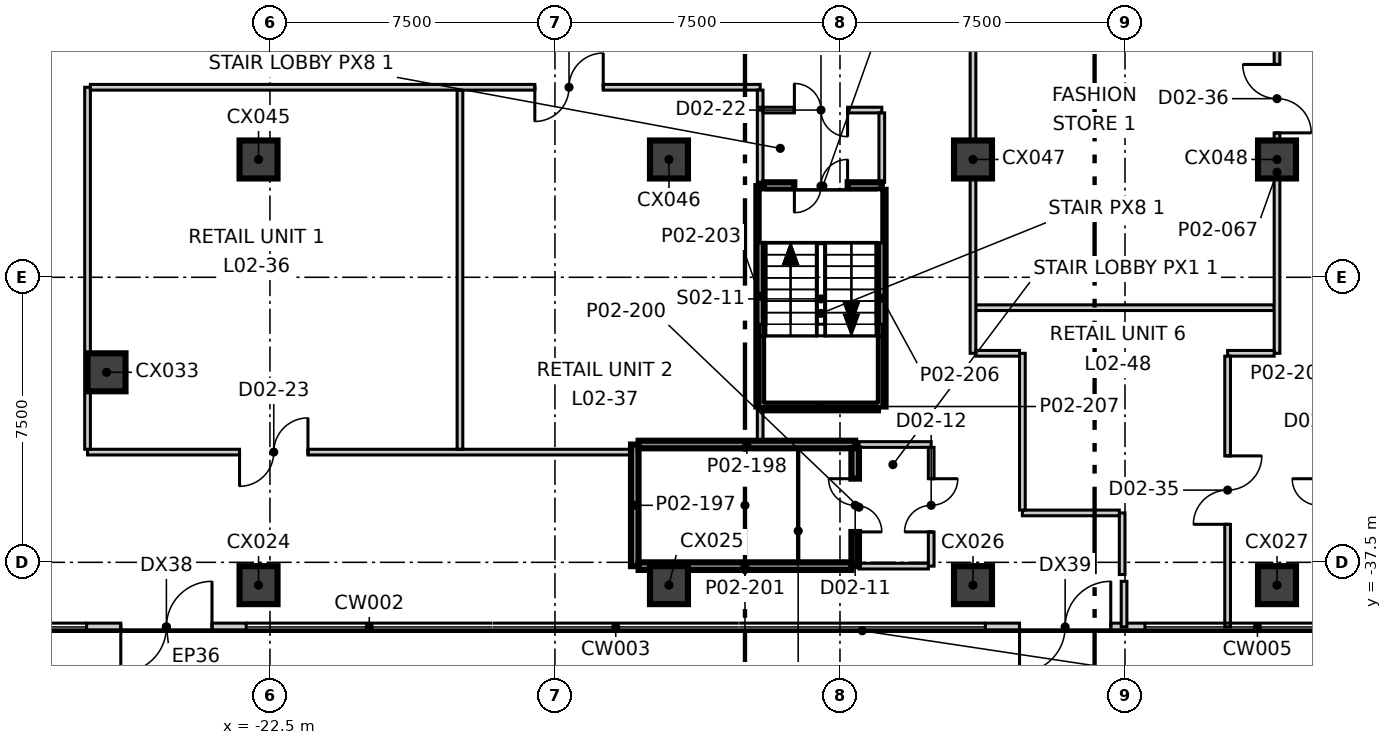
"""IFC4 building model, lengths in metres.
Left out: names, types, materials, properties, quantities, classifications, styles, units other than length and angle.
Written with IfcOpenShell. Run it as: python <this file> out.ifc"""

import sys

from ifc_helpers import new_model, si_unit, direction, frame, frame_2d, origin, origin_2d, place, context, subcontext, project, spatial, rectangle, extrude, element, fill, save


model = new_model("IFC4")
c1 = context("Model", 3, precision=1e-05, world=origin(), true_north=direction((0.0, 1.0)))
c2 = subcontext(c1, "Body", "Model", "MODEL_VIEW")
j1 = project(units=[si_unit("LENGTHUNIT", "METRE"), si_unit("PLANEANGLEUNIT", "RADIAN")], contexts=[c1])
p1 = place(None, origin())
s1 = spatial("IfcSite", under=j1, at=p1, CompositionType="ELEMENT")
p2 = place(p1, origin())
s2 = spatial("IfcBuilding", under=s1, at=p2, CompositionType="ELEMENT")
p3 = place(p2, frame((0.0, 0.0, 14.5)))
s3 = spatial("IfcBuildingStorey", under=s2, at=p3, CompositionType="ELEMENT", Elevation=14.5)
for number, where, z_axis, x_axis in (
    (1, (-22.8, -38.1, -0.4), (0.0, 0.0, 1.0), (1.0, 0.0, 0.0)),
    (2, (-12.0, -38.1, -0.4), (0.0, 0.0, 1.0), (1.0, 0.0, 0.0)),
    (3, (-4.0, -38.1, -0.4), (0.0, 0.0, 1.0), (1.0, 0.0, 0.0)),
    (4, (4.0, -38.1, -0.4), (0.0, 0.0, 1.0), (1.0, 0.0, 0.0)),
    (5, (-26.8, -32.5, -0.4), (0.0, 0.0, 1.0), (1.0, 0.0, 0.0)),
    (6, (-22.8, -26.9, -0.4), (0.0, 0.0, 1.0), (1.0, 0.0, 0.0)),
    (7, (-12.0, -26.9, -0.4), (0.0, 0.0, 1.0), (1.0, 0.0, 0.0)),
    (8, (-4.0, -26.9, -0.4), (0.0, 0.0, 1.0), (1.0, 0.0, 0.0)),
    (9, (4.0, -26.9, -0.4), (0.0, 0.0, 1.0), (1.0, 0.0, 0.0)),
):
    element("IfcColumn", number, at=place(p3, frame(where, z_axis=z_axis, x_axis=x_axis)), inside=s3, PredefinedType="COLUMN", context=c2, shape_type="SweptSolid", body=[
        extrude(rectangle(XDim=1.0, YDim=1.0, at=origin_2d()), origin(), (0.0, 0.0, 1.0), 5.4),
    ])
p4 = place(p3, frame((-27.325, -39.2, 0.0), z_axis=(0.0, 0.0, 1.0), x_axis=(1.0, 0.0, 0.0)))
e10 = element("IfcWall", 10, at=p4, inside=s3, PredefinedType="ELEMENTEDWALL", context=c2, shape_type="SweptSolid", body=[
    extrude(rectangle(XDim=4.2, YDim=0.2, at=frame_2d((2.1, 0.0))), origin(), (0.0, 0.0, 1.0), 5.0),
])
p5 = place(p4, frame((0.9, 0.0, 0.0)))
e11 = element("IfcOpeningElement", 11, at=p5, cuts=e10, PredefinedType="OPENING", context=c2, shape_type="SweptSolid", body=[
    extrude(rectangle(XDim=2.4, YDim=2.4, at=frame_2d((1.2, 1.2))), frame((0.0, 0.11, 0.0), z_axis=(0.0, -1.0, 0.0), x_axis=(1.0, 0.0, 0.0)), (0.0, 0.0, 1.0), 0.22),
])
p6 = place(p3, frame((-3.675, -39.2, 0.0), z_axis=(0.0, 0.0, 1.0), x_axis=(1.0, 0.0, 0.0)))
e12 = element("IfcWall", 12, at=p6, inside=s3, PredefinedType="ELEMENTEDWALL", context=c2, shape_type="SweptSolid", body=[
    extrude(rectangle(XDim=4.2, YDim=0.2, at=frame_2d((2.1, 0.0))), origin(), (0.0, 0.0, 1.0), 5.0),
])
p7 = place(p6, frame((0.9, 0.0, 0.0)))
e13 = element("IfcOpeningElement", 13, at=p7, cuts=e12, PredefinedType="OPENING", context=c2, shape_type="SweptSolid", body=[
    extrude(rectangle(XDim=2.4, YDim=2.4, at=frame_2d((1.2, 1.2))), frame((0.0, 0.11, 0.0), z_axis=(0.0, -1.0, 0.0), x_axis=(1.0, 0.0, 0.0)), (0.0, 0.0, 1.0), 0.22),
])
p8 = place(p3, frame((-9.6, -27.5, 0.0), z_axis=(0.0, 0.0, 1.0), x_axis=(0.0, 1.0, 0.0)))
e14 = element("IfcWall", 14, at=p8, inside=s3, PredefinedType="PARTITIONING", context=c2, shape_type="SweptSolid", body=[
    extrude(rectangle(XDim=1.9, YDim=0.15, at=frame_2d((0.95, 0.0))), origin(), (0.0, 0.0, 1.0), 5.0),
])
p9 = place(p3, frame((-9.525, -25.6, 0.0), z_axis=(0.0, 0.0, 1.0), x_axis=(1.0, 0.0, 0.0)))
e15 = element("IfcWall", 15, at=p9, inside=s3, PredefinedType="PARTITIONING", context=c2, shape_type="SweptSolid", body=[
    extrude(rectangle(XDim=3.125, YDim=0.15, at=frame_2d((1.562, 0.0))), origin(), (0.0, 0.0, 1.0), 5.0),
])
p10 = place(p9, frame((0.825, 0.0, 0.0)))
e16 = element("IfcOpeningElement", 16, at=p10, cuts=e15, PredefinedType="OPENING", context=c2, shape_type="SweptSolid", body=[
    extrude(rectangle(XDim=1.4, YDim=2.1, at=frame_2d((0.7, 1.05))), frame((0.0, 0.085, 0.0), z_axis=(0.0, -1.0, 0.0), x_axis=(1.0, 0.0, 0.0)), (0.0, 0.0, 1.0), 0.17),
])
p11 = place(p3, frame((-6.4, -27.5, 0.0), z_axis=(0.0, 0.0, 1.0), x_axis=(0.0, 1.0, 0.0)))
e17 = element("IfcWall", 17, at=p11, inside=s3, PredefinedType="PARTITIONING", context=c2, shape_type="SweptSolid", body=[
    extrude(rectangle(XDim=1.825, YDim=0.15, at=frame_2d((0.913, 0.0))), origin(), (0.0, 0.0, 1.0), 5.0),
])
p12 = place(p3, frame((-7.0, -34.4, 0.0), z_axis=(0.0, 0.0, 1.0), x_axis=(1.0, 0.0, 0.0)))
e18 = element("IfcWall", 18, at=p12, inside=s3, PredefinedType="PARTITIONING", context=c2, shape_type="SweptSolid", body=[
    extrude(rectangle(XDim=1.9, YDim=0.15, at=frame_2d((0.95, 0.0))), origin(), (0.0, 0.0, 1.0), 5.0),
])
p13 = place(p3, frame((-5.1, -37.6, 0.0), z_axis=(0.0, 0.0, 1.0), x_axis=(0.0, 1.0, 0.0)))
e19 = element("IfcWall", 19, at=p13, inside=s3, PredefinedType="PARTITIONING", context=c2, shape_type="SweptSolid", body=[
    extrude(rectangle(XDim=3.125, YDim=0.15, at=frame_2d((1.562, 0.0))), origin(), (0.0, 0.0, 1.0), 5.0),
])
p14 = place(p13, frame((0.9, 0.0, 0.0)))
e20 = element("IfcOpeningElement", 20, at=p14, cuts=e19, PredefinedType="OPENING", context=c2, shape_type="SweptSolid", body=[
    extrude(rectangle(XDim=1.4, YDim=2.1, at=frame_2d((0.7, 1.05))), frame((0.0, 0.085, 0.0), z_axis=(0.0, -1.0, 0.0), x_axis=(1.0, 0.0, 0.0)), (0.0, 0.0, 1.0), 0.17),
])
p15 = place(p3, frame((-7.0, -37.6, 0.0), z_axis=(0.0, 0.0, 1.0), x_axis=(1.0, 0.0, 0.0)))
e21 = element("IfcWall", 21, at=p15, inside=s3, PredefinedType="PARTITIONING", context=c2, shape_type="SweptSolid", body=[
    extrude(rectangle(XDim=1.825, YDim=0.15, at=frame_2d((0.913, 0.0))), origin(), (0.0, 0.0, 1.0), 5.0),
])
p16 = place(p3, frame((-27.3, -34.6, 0.0), z_axis=(0.0, 0.0, 1.0), x_axis=(1.0, 0.0, 0.0)))
e22 = element("IfcWall", 22, at=p16, inside=s3, PredefinedType="PARTITIONING", context=c2, shape_type="SweptSolid", body=[
    extrude(rectangle(XDim=14.3, YDim=0.15, at=frame_2d((7.15, 0.0))), origin(), (0.0, 0.0, 1.0), 5.0),
])
p17 = place(p16, frame((4.0, 0.0, 0.0)))
e23 = element("IfcOpeningElement", 23, at=p17, cuts=e22, PredefinedType="OPENING", context=c2, shape_type="SweptSolid", body=[
    extrude(rectangle(XDim=1.8, YDim=2.1, at=frame_2d((0.9, 1.05))), frame((0.0, 0.085, 0.0), z_axis=(0.0, -1.0, 0.0), x_axis=(1.0, 0.0, 0.0)), (0.0, 0.0, 1.0), 0.17),
])
p18 = place(p3, frame((-17.5, -34.525, 0.0), z_axis=(0.0, 0.0, 1.0), x_axis=(0.0, 1.0, 0.0)))
e24 = element("IfcWall", 24, at=p18, inside=s3, PredefinedType="PARTITIONING", context=c2, shape_type="SweptSolid", body=[
    extrude(rectangle(XDim=9.45, YDim=0.15, at=frame_2d((4.725, 0.0))), origin(), (0.0, 0.0, 1.0), 5.0),
])
p19 = place(p3, frame((-27.3, -34.525, 0.0), z_axis=(0.0, 0.0, 1.0), x_axis=(0.0, 1.0, 0.0)))
e25 = element("IfcWall", 25, at=p19, inside=s3, PredefinedType="PARTITIONING", context=c2, shape_type="SweptSolid", body=[
    extrude(rectangle(XDim=9.525, YDim=0.15, at=frame_2d((4.762, 0.0))), origin(), (0.0, 0.0, 1.0), 5.0),
])
p20 = place(p3, frame((-27.225, -25.0, 0.0), z_axis=(0.0, 0.0, 1.0), x_axis=(1.0, 0.0, 0.0)))
e26 = element("IfcWall", 26, at=p20, inside=s3, PredefinedType="PARTITIONING", context=c2, shape_type="SweptSolid", body=[
    extrude(rectangle(XDim=17.625, YDim=0.15, at=frame_2d((8.812, 0.0))), origin(), (0.0, 0.0, 1.0), 5.0),
])
p21 = place(p20, frame((11.695, 0.0, 0.0)))
e27 = element("IfcOpeningElement", 27, at=p21, cuts=e26, PredefinedType="OPENING", context=c2, shape_type="SweptSolid", body=[
    extrude(rectangle(XDim=1.8, YDim=2.1, at=frame_2d((0.9, 1.05))), frame((0.0, 0.085, 0.0), z_axis=(0.0, -1.0, 0.0), x_axis=(1.0, 0.0, 0.0)), (0.0, 0.0, 1.0), 0.17),
])
p22 = place(p3, frame((-9.6, -34.3, 0.0), z_axis=(0.0, 0.0, 1.0), x_axis=(0.0, 1.0, 0.0)))
e28 = element("IfcWall", 28, at=p22, inside=s3, PredefinedType="PARTITIONING", context=c2, shape_type="SweptSolid", body=[
    extrude(rectangle(XDim=0.802, YDim=0.15, at=frame_2d((0.401, 0.0))), origin(), (0.0, 0.0, 1.0), 5.0),
])
p23 = place(p3, frame((-9.6, -25.527, 0.0), z_axis=(0.0, 0.0, 1.0), x_axis=(0.0, 1.0, 0.0)))
e29 = element("IfcWall", 29, at=p23, inside=s3, PredefinedType="PARTITIONING", context=c2, shape_type="SweptSolid", body=[
    extrude(rectangle(XDim=0.452, YDim=0.15, at=frame_2d((0.226, 0.0))), origin(), (0.0, 0.0, 1.0), 5.0),
])
p24 = place(p3, frame((-3.925, -30.8, 0.0), z_axis=(0.0, 0.0, 1.0), x_axis=(1.0, 0.0, 0.0)))
e30 = element("IfcWall", 30, at=p24, inside=s3, PredefinedType="PARTITIONING", context=c2, shape_type="SweptSolid", body=[
    extrude(rectangle(XDim=7.85, YDim=0.15, at=frame_2d((3.925, 0.0))), origin(), (0.0, 0.0, 1.0), 5.0),
])
p25 = place(p3, frame((-4.0, -32.0, 0.0), z_axis=(0.0, 0.0, 1.0), x_axis=(0.0, 1.0, 0.0)))
e31 = element("IfcWall", 31, at=p25, inside=s3, PredefinedType="PARTITIONING", context=c2, shape_type="SweptSolid", body=[
    extrude(rectangle(XDim=9.6, YDim=0.15, at=frame_2d((4.8, 0.0))), origin(), (0.0, 0.0, 1.0), 3.2),
])
p26 = place(p3, frame((4.0, -32.0, 0.0), z_axis=(0.0, 0.0, 1.0), x_axis=(0.0, 1.0, 0.0)))
e32 = element("IfcWall", 32, at=p26, inside=s3, PredefinedType="PARTITIONING", context=c2, shape_type="SweptSolid", body=[
    extrude(rectangle(XDim=9.525, YDim=0.15, at=frame_2d((4.762, 0.0))), origin(), (0.0, 0.0, 1.0), 3.2),
])
p27 = place(p26, frame((5.8, 0.0, 0.0)))
e33 = element("IfcOpeningElement", 33, at=p27, cuts=e32, PredefinedType="OPENING", context=c2, shape_type="SweptSolid", body=[
    extrude(rectangle(XDim=1.8, YDim=2.1, at=frame_2d((0.9, 1.05))), frame((0.0, 0.085, 0.0), z_axis=(0.0, -1.0, 0.0), x_axis=(1.0, 0.0, 0.0)), (0.0, 0.0, 1.0), 0.17),
])
p28 = place(p3, frame((-0.025, -39.2, 0.0), z_axis=(0.0, 0.0, 1.0), x_axis=(0.0, 1.0, 0.0)))
e34 = element("IfcWall", 34, at=p28, inside=s3, PredefinedType="PARTITIONING", context=c2, shape_type="SweptSolid", body=[
    extrude(rectangle(XDim=1.2, YDim=0.15, at=frame_2d((0.6, 0.0))), origin(), (0.0, 0.0, 1.0), 5.0),
])
p29 = place(p3, frame((-0.075, -37.821, 0.0), z_axis=(0.0, 0.0, 1.0), x_axis=(0.0, 1.0, 0.0)))
e35 = element("IfcWall", 35, at=p29, inside=s3, PredefinedType="PARTITIONING", context=c2, shape_type="SweptSolid", body=[
    extrude(rectangle(XDim=1.621, YDim=0.15, at=frame_2d((0.811, 0.0))), origin(), (0.0, 0.0, 1.0), 5.0),
])
p30 = place(p3, frame((-2.7, -36.2, 0.0), z_axis=(0.0, 0.0, 1.0), x_axis=(1.0, 0.0, 0.0)))
e36 = element("IfcWall", 36, at=p30, inside=s3, PredefinedType="PARTITIONING", context=c2, shape_type="SweptSolid", body=[
    extrude(rectangle(XDim=2.55, YDim=0.15, at=frame_2d((1.275, 0.0))), origin(), (0.0, 0.0, 1.0), 5.0),
])
p31 = place(p3, frame((-2.7, -36.125, 0.0), z_axis=(0.0, 0.0, 1.0), x_axis=(0.0, 1.0, 0.0)))
e37 = element("IfcWall", 37, at=p31, inside=s3, PredefinedType="PARTITIONING", context=c2, shape_type="SweptSolid", body=[
    extrude(rectangle(XDim=4.125, YDim=0.15, at=frame_2d((2.062, 0.0))), origin(), (0.0, 0.0, 1.0), 5.0),
])
p32 = place(p3, frame((-3.925, -32.0, 0.0), z_axis=(0.0, 0.0, 1.0), x_axis=(1.0, 0.0, 0.0)))
e38 = element("IfcWall", 38, at=p32, inside=s3, PredefinedType="PARTITIONING", context=c2, shape_type="SweptSolid", body=[
    extrude(rectangle(XDim=1.15, YDim=0.15, at=frame_2d((0.575, 0.0))), origin(), (0.0, 0.0, 1.0), 5.0),
])
p33 = place(p3, frame((2.7, -32.0, 0.0), z_axis=(0.0, 0.0, 1.0), x_axis=(1.0, 0.0, 0.0)))
e39 = element("IfcWall", 39, at=p33, inside=s3, PredefinedType="PARTITIONING", context=c2, shape_type="SweptSolid", body=[
    extrude(rectangle(XDim=1.225, YDim=0.15, at=frame_2d((0.613, 0.0))), origin(), (0.0, 0.0, 1.0), 5.0),
])
p34 = place(p3, frame((2.7, -39.2, 0.0), z_axis=(0.0, 0.0, 1.0), x_axis=(0.0, 1.0, 0.0)))
e40 = element("IfcWall", 40, at=p34, inside=s3, PredefinedType="PARTITIONING", context=c2, shape_type="SweptSolid", body=[
    extrude(rectangle(XDim=7.125, YDim=0.15, at=frame_2d((3.562, 0.0))), origin(), (0.0, 0.0, 1.0), 5.0),
])
p35 = place(p34, frame((2.7, 0.0, 0.0)))
e41 = element("IfcOpeningElement", 41, at=p35, cuts=e40, PredefinedType="OPENING", context=c2, shape_type="SweptSolid", body=[
    extrude(rectangle(XDim=1.8, YDim=2.1, at=frame_2d((0.9, 1.05))), frame((0.0, 0.085, 0.0), z_axis=(0.0, -1.0, 0.0), x_axis=(1.0, 0.0, 0.0)), (0.0, 0.0, 1.0), 0.17),
])
p36 = place(p3, frame((-12.9, -37.6, 0.0), z_axis=(0.0, 0.0, 1.0), x_axis=(0.0, 1.0, 0.0)))
e42 = element("IfcWall", 42, at=p36, inside=s3, PredefinedType="SOLIDWALL", context=c2, shape_type="SweptSolid", body=[
    extrude(rectangle(XDim=3.2, YDim=0.2, at=frame_2d((1.6, 0.0))), origin(), (0.0, 0.0, 1.0), 5.0),
])
p37 = place(p3, frame((-12.8, -34.4, 0.0), z_axis=(0.0, 0.0, 1.0), x_axis=(1.0, 0.0, 0.0)))
e43 = element("IfcWall", 43, at=p37, inside=s3, PredefinedType="SOLIDWALL", context=c2, shape_type="SweptSolid", body=[
    extrude(rectangle(XDim=5.7, YDim=0.2, at=frame_2d((2.85, 0.0))), origin(), (0.0, 0.0, 1.0), 5.0),
])
p38 = place(p3, frame((-7.1, -37.6, 0.0), z_axis=(0.0, 0.0, 1.0), x_axis=(0.0, 1.0, 0.0)))
e44 = element("IfcWall", 44, at=p38, inside=s3, PredefinedType="SOLIDWALL", context=c2, shape_type="SweptSolid", body=[
    extrude(rectangle(XDim=3.1, YDim=0.2, at=frame_2d((1.55, 0.0))), origin(), (0.0, 0.0, 1.0), 5.0),
])
p39 = place(p38, frame((0.9, 0.0, 0.0)))
e45 = element("IfcOpeningElement", 45, at=p39, cuts=e44, PredefinedType="OPENING", context=c2, shape_type="SweptSolid", body=[
    extrude(rectangle(XDim=1.4, YDim=2.1, at=frame_2d((0.7, 1.05))), frame((0.0, 0.11, 0.0), z_axis=(0.0, -1.0, 0.0), x_axis=(1.0, 0.0, 0.0)), (0.0, 0.0, 1.0), 0.22),
])
p40 = place(p3, frame((-12.8, -37.6, 0.0), z_axis=(0.0, 0.0, 1.0), x_axis=(1.0, 0.0, 0.0)))
e46 = element("IfcWall", 46, at=p40, inside=s3, PredefinedType="SOLIDWALL", context=c2, shape_type="SweptSolid", body=[
    extrude(rectangle(XDim=5.6, YDim=0.2, at=frame_2d((2.8, 0.0))), origin(), (0.0, 0.0, 1.0), 5.0),
])
p41 = place(p3, frame((-9.6, -33.4, 0.0), z_axis=(0.0, 0.0, 1.0), x_axis=(0.0, 1.0, 0.0)))
e47 = element("IfcWall", 47, at=p41, inside=s3, PredefinedType="SOLIDWALL", context=c2, shape_type="SweptSolid", body=[
    extrude(rectangle(XDim=5.8, YDim=0.2, at=frame_2d((2.9, 0.0))), origin(), (0.0, 0.0, 1.0), 5.0),
])
p42 = place(p3, frame((-9.5, -27.6, 0.0), z_axis=(0.0, 0.0, 1.0), x_axis=(1.0, 0.0, 0.0)))
e48 = element("IfcWall", 48, at=p42, inside=s3, PredefinedType="SOLIDWALL", context=c2, shape_type="SweptSolid", body=[
    extrude(rectangle(XDim=3.1, YDim=0.2, at=frame_2d((1.55, 0.0))), origin(), (0.0, 0.0, 1.0), 5.0),
])
p43 = place(p42, frame((0.8, 0.0, 0.0)))
e49 = element("IfcOpeningElement", 49, at=p43, cuts=e48, PredefinedType="OPENING", context=c2, shape_type="SweptSolid", body=[
    extrude(rectangle(XDim=1.4, YDim=2.1, at=frame_2d((0.7, 1.05))), frame((0.0, 0.11, 0.0), z_axis=(0.0, -1.0, 0.0), x_axis=(1.0, 0.0, 0.0)), (0.0, 0.0, 1.0), 0.22),
])
p44 = place(p3, frame((-6.4, -33.4, 0.0), z_axis=(0.0, 0.0, 1.0), x_axis=(0.0, 1.0, 0.0)))
e50 = element("IfcWall", 50, at=p44, inside=s3, PredefinedType="SOLIDWALL", context=c2, shape_type="SweptSolid", body=[
    extrude(rectangle(XDim=5.7, YDim=0.2, at=frame_2d((2.85, 0.0))), origin(), (0.0, 0.0, 1.0), 5.0),
])
p45 = place(p3, frame((-9.5, -33.4, 0.0), z_axis=(0.0, 0.0, 1.0), x_axis=(1.0, 0.0, 0.0)))
e51 = element("IfcWall", 51, at=p45, inside=s3, PredefinedType="SOLIDWALL", context=c2, shape_type="SweptSolid", body=[
    extrude(rectangle(XDim=3.0, YDim=0.2, at=frame_2d((1.5, 0.0))), origin(), (0.0, 0.0, 1.0), 5.0),
])
p46 = place(p5, frame((2.4, 0.0, 0.0), z_axis=(0.0, 0.0, 1.0), x_axis=(-1.0, 0.0, 0.0)))
e52 = element("IfcDoor", 52, at=p46, inside=s3, OperationType="DOUBLE_DOOR_SINGLE_SWING", PredefinedType="DOOR", context=c2, shape_type="SweptSolid", body=[
    extrude(rectangle(XDim=2.4, YDim=2.4, at=frame_2d((1.2, 1.2))), frame((0.0, 0.025, 0.0), z_axis=(0.0, -1.0, 0.0), x_axis=(1.0, 0.0, 0.0)), (0.0, 0.0, 1.0), 0.05),
])
fill(e11, e52)
p47 = place(p7, frame((2.4, 0.0, 0.0), z_axis=(0.0, 0.0, 1.0), x_axis=(-1.0, 0.0, 0.0)))
e53 = element("IfcDoor", 53, at=p47, inside=s3, OperationType="DOUBLE_DOOR_SINGLE_SWING", PredefinedType="DOOR", context=c2, shape_type="SweptSolid", body=[
    extrude(rectangle(XDim=2.4, YDim=2.4, at=frame_2d((1.2, 1.2))), frame((0.0, 0.025, 0.0), z_axis=(0.0, -1.0, 0.0), x_axis=(1.0, 0.0, 0.0)), (0.0, 0.0, 1.0), 0.05),
])
fill(e13, e53)
p48 = place(p39, origin())
e54 = element("IfcDoor", 54, at=p48, inside=s3, OperationType="DOUBLE_DOOR_SINGLE_SWING", PredefinedType="DOOR", context=c2, shape_type="SweptSolid", body=[
    extrude(rectangle(XDim=1.4, YDim=2.1, at=frame_2d((0.7, 1.05))), frame((0.0, 0.025, 0.0), z_axis=(0.0, -1.0, 0.0), x_axis=(1.0, 0.0, 0.0)), (0.0, 0.0, 1.0), 0.05),
])
fill(e45, e54)
p49 = place(p14, origin())
e55 = element("IfcDoor", 55, at=p49, inside=s3, OperationType="DOUBLE_DOOR_SINGLE_SWING", PredefinedType="DOOR", context=c2, shape_type="SweptSolid", body=[
    extrude(rectangle(XDim=1.4, YDim=2.1, at=frame_2d((0.7, 1.05))), frame((0.0, 0.025, 0.0), z_axis=(0.0, -1.0, 0.0), x_axis=(1.0, 0.0, 0.0)), (0.0, 0.0, 1.0), 0.05),
])
fill(e20, e55)
p50 = place(p43, origin())
e56 = element("IfcDoor", 56, at=p50, inside=s3, OperationType="DOUBLE_DOOR_SINGLE_SWING", PredefinedType="DOOR", context=c2, shape_type="SweptSolid", body=[
    extrude(rectangle(XDim=1.4, YDim=2.1, at=frame_2d((0.7, 1.05))), frame((0.0, 0.025, 0.0), z_axis=(0.0, -1.0, 0.0), x_axis=(1.0, 0.0, 0.0)), (0.0, 0.0, 1.0), 0.05),
])
fill(e49, e56)
p51 = place(p10, origin())
e57 = element("IfcDoor", 57, at=p51, inside=s3, OperationType="DOUBLE_DOOR_SINGLE_SWING", PredefinedType="DOOR", context=c2, shape_type="SweptSolid", body=[
    extrude(rectangle(XDim=1.4, YDim=2.1, at=frame_2d((0.7, 1.05))), frame((0.0, 0.025, 0.0), z_axis=(0.0, -1.0, 0.0), x_axis=(1.0, 0.0, 0.0)), (0.0, 0.0, 1.0), 0.05),
])
fill(e16, e57)
p52 = place(p17, origin())
e58 = element("IfcDoor", 58, at=p52, inside=s3, OperationType="DOUBLE_DOOR_SINGLE_SWING", PredefinedType="DOOR", context=c2, shape_type="SweptSolid", body=[
    extrude(rectangle(XDim=1.8, YDim=2.1, at=frame_2d((0.9, 1.05))), frame((0.0, 0.025, 0.0), z_axis=(0.0, -1.0, 0.0), x_axis=(1.0, 0.0, 0.0)), (0.0, 0.0, 1.0), 0.05),
])
fill(e23, e58)
p53 = place(p21, origin())
e59 = element("IfcDoor", 59, at=p53, inside=s3, OperationType="DOUBLE_DOOR_SINGLE_SWING", PredefinedType="DOOR", context=c2, shape_type="SweptSolid", body=[
    extrude(rectangle(XDim=1.8, YDim=2.1, at=frame_2d((0.9, 1.05))), frame((0.0, 0.025, 0.0), z_axis=(0.0, -1.0, 0.0), x_axis=(1.0, 0.0, 0.0)), (0.0, 0.0, 1.0), 0.05),
])
fill(e27, e59)
p54 = place(p35, origin())
e60 = element("IfcDoor", 60, at=p54, inside=s3, OperationType="DOUBLE_DOOR_SINGLE_SWING", PredefinedType="DOOR", context=c2, shape_type="SweptSolid", body=[
    extrude(rectangle(XDim=1.8, YDim=2.1, at=frame_2d((0.9, 1.05))), frame((0.0, 0.025, 0.0), z_axis=(0.0, -1.0, 0.0), x_axis=(1.0, 0.0, 0.0)), (0.0, 0.0, 1.0), 0.05),
])
fill(e41, e60)
p55 = place(p27, origin())
e61 = element("IfcDoor", 61, at=p55, inside=s3, OperationType="DOUBLE_DOOR_SINGLE_SWING", PredefinedType="DOOR", context=c2, shape_type="SweptSolid", body=[
    extrude(rectangle(XDim=1.8, YDim=2.1, at=frame_2d((0.9, 1.05))), frame((0.0, 0.025, 0.0), z_axis=(0.0, -1.0, 0.0), x_axis=(1.0, 0.0, 0.0)), (0.0, 0.0, 1.0), 0.05),
])
fill(e33, e61)
save(model, sys.argv[1])
